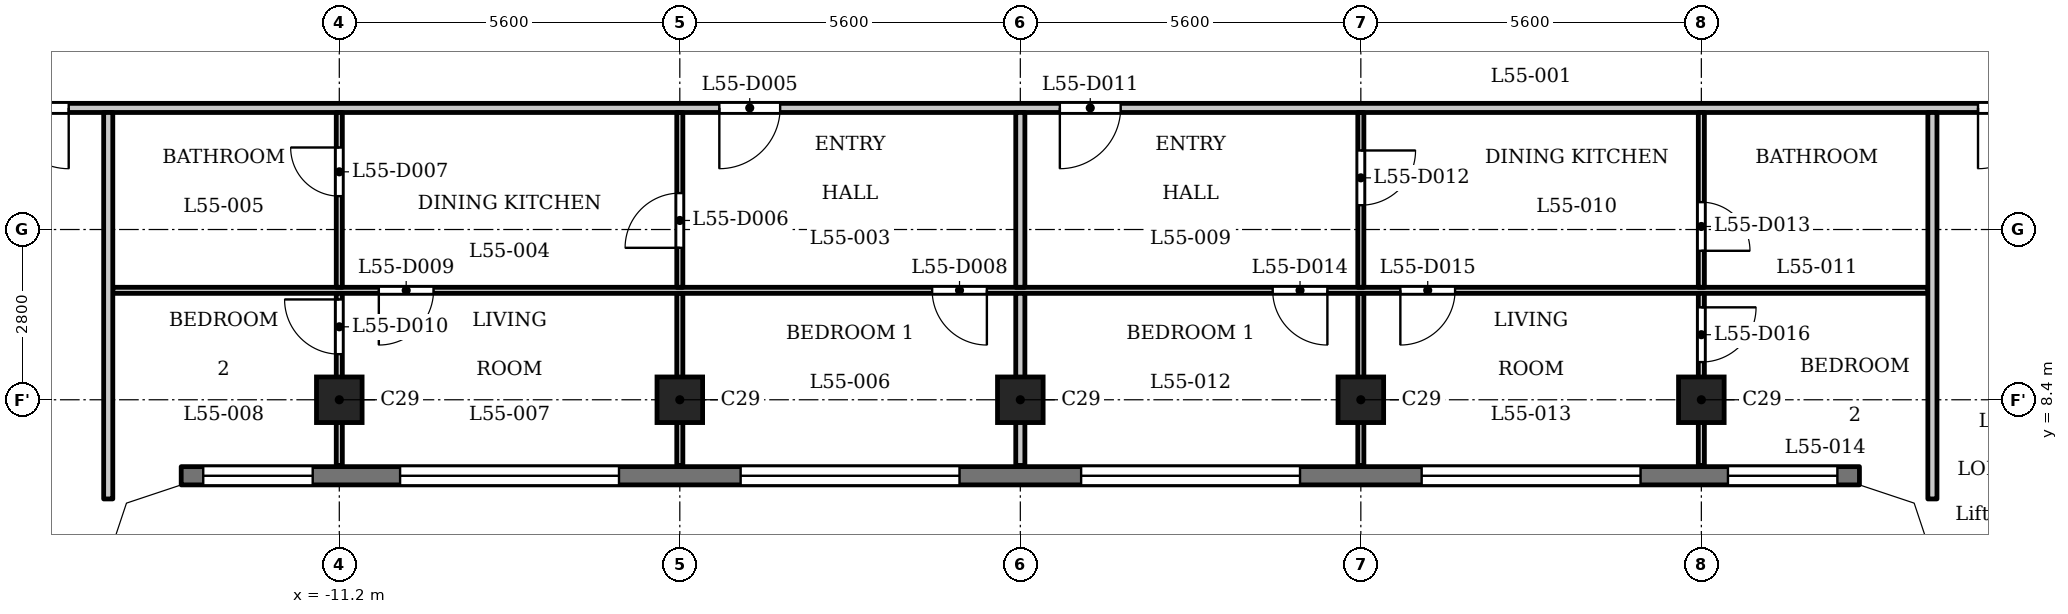
"""IFC4 building model, lengths in metres.
Left out: names, types, materials, properties, quantities, classifications, styles, units other than length and angle.
Written with IfcOpenShell. Run it as: python <this file> out.ifc"""

import sys

from ifc_helpers import new_model, si_unit, direction, frame, frame_2d, origin, origin_2d, place, context, subcontext, project, spatial, polyline, rectangle, outline, extrude, element, fill, save


model = new_model("IFC4")
c1 = context("Model", 3, precision=1e-05, world=origin(), true_north=direction((0.0, 1.0)))
c2 = subcontext(c1, "Body", "Model", "MODEL_VIEW")
j1 = project(units=[si_unit("LENGTHUNIT", "METRE"), si_unit("PLANEANGLEUNIT", "RADIAN")], contexts=[c1])
p1 = place(None, origin())
s1 = spatial("IfcSite", under=j1, at=p1, CompositionType="ELEMENT")
p2 = place(p1, origin())
s2 = spatial("IfcBuilding", under=s1, at=p2, CompositionType="ELEMENT")
p3 = place(p2, frame((0.0, 0.0, 213.4)))
s3 = spatial("IfcBuildingStorey", under=s2, at=p3, CompositionType="ELEMENT", Elevation=213.4)
for number, where, z_axis, x_axis in (
    (1, (-11.2, 8.4, 0.0), (0.0, 0.0, 1.0), (1.0, 0.0, 0.0)),
    (2, (-5.6, 8.4, 0.0), (0.0, 0.0, 1.0), (1.0, 0.0, 0.0)),
    (3, (0.0, 8.4, 0.0), (0.0, 0.0, 1.0), (1.0, 0.0, 0.0)),
    (4, (5.6, 8.4, 0.0), (0.0, 0.0, 1.0), (1.0, 0.0, 0.0)),
    (5, (11.2, 8.4, 0.0), (0.0, 0.0, 1.0), (1.0, 0.0, 0.0)),
):
    element("IfcColumn", number, at=place(p3, frame(where, z_axis=z_axis, x_axis=x_axis)), inside=s3, PredefinedType="COLUMN", context=c2, shape_type="SweptSolid", body=[
        extrude(rectangle(XDim=0.75, YDim=0.75, at=origin_2d()), origin(), (0.0, 0.0, 1.0), 3.5),
    ])
p4 = place(p3, frame((-13.8, 7.15, 0.0), z_axis=(0.0, 0.0, 1.0), x_axis=(1.0, 0.0, 0.0)))
e6 = element("IfcWall", 6, at=p4, inside=s3, PredefinedType="SOLIDWALL", context=c2, shape_type="SweptSolid", body=[
    extrude(rectangle(XDim=27.6, YDim=0.3, at=frame_2d((13.8, 0.0))), origin(), (0.0, 0.0, 1.0), 3.2),
])
p5 = place(p4, frame((0.363, 0.0, 0.9)))
e7 = element("IfcOpeningElement", 7, at=p5, cuts=e6, PredefinedType="OPENING", context=c2, shape_type="SweptSolid", body=[
    extrude(rectangle(XDim=1.8, YDim=1.25, at=frame_2d((0.9, 0.625))), frame((0.0, 0.16, 0.0), z_axis=(0.0, -1.0, 0.0), x_axis=(1.0, 0.0, 0.0)), (0.0, 0.0, 1.0), 0.32),
])
p6 = place(p4, frame((3.6, 0.0, 1.2)))
e8 = element("IfcOpeningElement", 8, at=p6, cuts=e6, PredefinedType="OPENING", context=c2, shape_type="SweptSolid", body=[
    extrude(rectangle(XDim=3.6, YDim=0.95, at=frame_2d((1.8, 0.475))), frame((0.0, 0.16, 0.0), z_axis=(0.0, -1.0, 0.0), x_axis=(1.0, 0.0, 0.0)), (0.0, 0.0, 1.0), 0.32),
])
p7 = place(p4, frame((9.2, 0.0, 1.2)))
e9 = element("IfcOpeningElement", 9, at=p7, cuts=e6, PredefinedType="OPENING", context=c2, shape_type="SweptSolid", body=[
    extrude(rectangle(XDim=3.6, YDim=0.95, at=frame_2d((1.8, 0.475))), frame((0.0, 0.16, 0.0), z_axis=(0.0, -1.0, 0.0), x_axis=(1.0, 0.0, 0.0)), (0.0, 0.0, 1.0), 0.32),
])
p8 = place(p4, frame((14.8, 0.0, 1.2)))
e10 = element("IfcOpeningElement", 10, at=p8, cuts=e6, PredefinedType="OPENING", context=c2, shape_type="SweptSolid", body=[
    extrude(rectangle(XDim=3.6, YDim=0.95, at=frame_2d((1.8, 0.475))), frame((0.0, 0.16, 0.0), z_axis=(0.0, -1.0, 0.0), x_axis=(1.0, 0.0, 0.0)), (0.0, 0.0, 1.0), 0.32),
])
p9 = place(p4, frame((20.4, 0.0, 1.2)))
e11 = element("IfcOpeningElement", 11, at=p9, cuts=e6, PredefinedType="OPENING", context=c2, shape_type="SweptSolid", body=[
    extrude(rectangle(XDim=3.6, YDim=0.95, at=frame_2d((1.8, 0.475))), frame((0.0, 0.16, 0.0), z_axis=(0.0, -1.0, 0.0), x_axis=(1.0, 0.0, 0.0)), (0.0, 0.0, 1.0), 0.32),
])
p10 = place(p4, frame((25.438, 0.0, 0.9)))
e12 = element("IfcOpeningElement", 12, at=p10, cuts=e6, PredefinedType="OPENING", context=c2, shape_type="SweptSolid", body=[
    extrude(rectangle(XDim=1.8, YDim=1.25, at=frame_2d((0.9, 0.625))), frame((0.0, 0.16, 0.0), z_axis=(0.0, -1.0, 0.0), x_axis=(1.0, 0.0, 0.0)), (0.0, 0.0, 1.0), 0.32),
])
p11 = place(p3, frame((-14.925, 10.2, 0.0), z_axis=(0.0, 0.0, 1.0), x_axis=(1.0, 0.0, 0.0)))
e13 = element("IfcWall", 13, at=p11, inside=s3, PredefinedType="PARTITIONING", context=c2, shape_type="SweptSolid", body=[
    extrude(rectangle(XDim=29.85, YDim=0.1, at=frame_2d((14.925, 0.0))), origin(), (0.0, 0.0, 1.0), 3.2),
])
p12 = place(p11, frame((13.475, 0.0, 0.0)))
e14 = element("IfcOpeningElement", 14, at=p12, cuts=e13, PredefinedType="OPENING", context=c2, shape_type="SweptSolid", body=[
    extrude(rectangle(XDim=0.9, YDim=2.1, at=frame_2d((0.45, 1.05))), frame((0.0, 0.06, 0.0), z_axis=(0.0, -1.0, 0.0), x_axis=(1.0, 0.0, 0.0)), (0.0, 0.0, 1.0), 0.12),
])
p13 = place(p11, frame((4.375, 0.0, 0.0)))
e15 = element("IfcOpeningElement", 15, at=p13, cuts=e13, PredefinedType="OPENING", context=c2, shape_type="SweptSolid", body=[
    extrude(rectangle(XDim=0.9, YDim=2.1, at=frame_2d((0.45, 1.05))), frame((0.0, 0.06, 0.0), z_axis=(0.0, -1.0, 0.0), x_axis=(1.0, 0.0, 0.0)), (0.0, 0.0, 1.0), 0.12),
])
p14 = place(p11, frame((19.075, 0.0, 0.0)))
e16 = element("IfcOpeningElement", 16, at=p14, cuts=e13, PredefinedType="OPENING", context=c2, shape_type="SweptSolid", body=[
    extrude(rectangle(XDim=0.9, YDim=2.1, at=frame_2d((0.45, 1.05))), frame((0.0, 0.06, 0.0), z_axis=(0.0, -1.0, 0.0), x_axis=(1.0, 0.0, 0.0)), (0.0, 0.0, 1.0), 0.12),
])
p15 = place(p11, frame((21.175, 0.0, 0.0)))
e17 = element("IfcOpeningElement", 17, at=p15, cuts=e13, PredefinedType="OPENING", context=c2, shape_type="SweptSolid", body=[
    extrude(rectangle(XDim=0.9, YDim=2.1, at=frame_2d((0.45, 1.05))), frame((0.0, 0.06, 0.0), z_axis=(0.0, -1.0, 0.0), x_axis=(1.0, 0.0, 0.0)), (0.0, 0.0, 1.0), 0.12),
])
p16 = place(p3, frame((-17.4, 13.2, 0.0), z_axis=(0.0, 0.0, 1.0), x_axis=(1.0, 0.0, 0.0)))
e18 = element("IfcWall", 18, at=p16, inside=s3, PredefinedType="PARTITIONING", context=c2, shape_type="SweptSolid", body=[
    extrude(rectangle(XDim=34.8, YDim=0.15, at=frame_2d((17.4, 0.0))), origin(), (0.0, 0.0, 1.0), 3.2),
])
p17 = place(p16, frame((0.75, 0.0, 0.0)))
e19 = element("IfcOpeningElement", 19, at=p17, cuts=e18, PredefinedType="OPENING", context=c2, shape_type="SweptSolid", body=[
    extrude(rectangle(XDim=1.0, YDim=2.1, at=frame_2d((0.5, 1.05))), frame((0.0, 0.085, 0.0), z_axis=(0.0, -1.0, 0.0), x_axis=(1.0, 0.0, 0.0)), (0.0, 0.0, 1.0), 0.17),
])
p18 = place(p16, frame((33.15, 0.0, 0.0)))
e20 = element("IfcOpeningElement", 20, at=p18, cuts=e18, PredefinedType="OPENING", context=c2, shape_type="SweptSolid", body=[
    extrude(rectangle(XDim=1.0, YDim=2.1, at=frame_2d((0.5, 1.05))), frame((0.0, 0.085, 0.0), z_axis=(0.0, -1.0, 0.0), x_axis=(1.0, 0.0, 0.0)), (0.0, 0.0, 1.0), 0.17),
])
p19 = place(p16, frame((12.45, 0.0, 0.0)))
e21 = element("IfcOpeningElement", 21, at=p19, cuts=e18, PredefinedType="OPENING", context=c2, shape_type="SweptSolid", body=[
    extrude(rectangle(XDim=1.0, YDim=2.1, at=frame_2d((0.5, 1.05))), frame((0.0, 0.085, 0.0), z_axis=(0.0, -1.0, 0.0), x_axis=(1.0, 0.0, 0.0)), (0.0, 0.0, 1.0), 0.17),
])
p20 = place(p16, frame((18.05, 0.0, 0.0)))
e22 = element("IfcOpeningElement", 22, at=p20, cuts=e18, PredefinedType="OPENING", context=c2, shape_type="SweptSolid", body=[
    extrude(rectangle(XDim=1.0, YDim=2.1, at=frame_2d((0.5, 1.05))), frame((0.0, 0.085, 0.0), z_axis=(0.0, -1.0, 0.0), x_axis=(1.0, 0.0, 0.0)), (0.0, 0.0, 1.0), 0.17),
])
p21 = place(p3, frame((-15.0, 6.769, 0.0), z_axis=(0.0, 0.0, 1.0), x_axis=(0.0, 1.0, 0.0)))
e23 = element("IfcWall", 23, at=p21, inside=s3, PredefinedType="PARTITIONING", context=c2, shape_type="SweptSolid", body=[
    extrude(rectangle(XDim=6.356, YDim=0.15, at=frame_2d((3.178, 0.0))), origin(), (0.0, 0.0, 1.0), 3.2),
])
p22 = place(p3, frame((-11.2, 7.32, 0.0), z_axis=(0.0, 0.0, 1.0), x_axis=(0.0, 1.0, 0.0)))
e24 = element("IfcWall", 24, at=p22, inside=s3, PredefinedType="PARTITIONING", context=c2, shape_type="SweptSolid", body=[
    extrude(rectangle(XDim=2.83, YDim=0.1, at=frame_2d((1.415, 0.0))), origin(), (0.0, 0.0, 1.0), 3.2),
])
p23 = place(p22, frame((1.83, 0.0, 0.0)))
e25 = element("IfcOpeningElement", 25, at=p23, cuts=e24, PredefinedType="OPENING", context=c2, shape_type="SweptSolid", body=[
    extrude(rectangle(XDim=0.9, YDim=2.1, at=frame_2d((0.45, 1.05))), frame((0.0, 0.06, 0.0), z_axis=(0.0, -1.0, 0.0), x_axis=(1.0, 0.0, 0.0)), (0.0, 0.0, 1.0), 0.12),
])
p24 = place(p3, frame((-11.2, 10.25, 0.0), z_axis=(0.0, 0.0, 1.0), x_axis=(0.0, 1.0, 0.0)))
e26 = element("IfcWall", 26, at=p24, inside=s3, PredefinedType="PARTITIONING", context=c2, shape_type="SweptSolid", body=[
    extrude(rectangle(XDim=2.875, YDim=0.1, at=frame_2d((1.438, 0.0))), origin(), (0.0, 0.0, 1.0), 3.2),
])
p25 = place(p24, frame((1.499, 0.0, 0.0)))
e27 = element("IfcOpeningElement", 27, at=p25, cuts=e26, PredefinedType="OPENING", context=c2, shape_type="SweptSolid", body=[
    extrude(rectangle(XDim=0.8, YDim=2.1, at=frame_2d((0.4, 1.05))), frame((0.0, 0.06, 0.0), z_axis=(0.0, -1.0, 0.0), x_axis=(1.0, 0.0, 0.0)), (0.0, 0.0, 1.0), 0.12),
])
p26 = place(p3, frame((-5.6, 7.32, 0.0), z_axis=(0.0, 0.0, 1.0), x_axis=(0.0, 1.0, 0.0)))
e28 = element("IfcWall", 28, at=p26, inside=s3, PredefinedType="PARTITIONING", context=c2, shape_type="SweptSolid", body=[
    extrude(rectangle(XDim=2.83, YDim=0.1, at=frame_2d((1.415, 0.0))), origin(), (0.0, 0.0, 1.0), 3.2),
])
p27 = place(p3, frame((-5.6, 10.25, 0.0), z_axis=(0.0, 0.0, 1.0), x_axis=(0.0, 1.0, 0.0)))
e29 = element("IfcWall", 29, at=p27, inside=s3, PredefinedType="PARTITIONING", context=c2, shape_type="SweptSolid", body=[
    extrude(rectangle(XDim=2.875, YDim=0.1, at=frame_2d((1.438, 0.0))), origin(), (0.0, 0.0, 1.0), 3.2),
])
p28 = place(p27, frame((0.649, 0.0, 0.0)))
e30 = element("IfcOpeningElement", 30, at=p28, cuts=e29, PredefinedType="OPENING", context=c2, shape_type="SweptSolid", body=[
    extrude(rectangle(XDim=0.9, YDim=2.1, at=frame_2d((0.45, 1.05))), frame((0.0, 0.06, 0.0), z_axis=(0.0, -1.0, 0.0), x_axis=(1.0, 0.0, 0.0)), (0.0, 0.0, 1.0), 0.12),
])
p29 = place(p3, frame((0.0, 7.32, 0.0), z_axis=(0.0, 0.0, 1.0), x_axis=(0.0, 1.0, 0.0)))
e31 = element("IfcWall", 31, at=p29, inside=s3, PredefinedType="PARTITIONING", context=c2, shape_type="SweptSolid", body=[
    extrude(rectangle(XDim=2.83, YDim=0.15, at=frame_2d((1.415, 0.0))), origin(), (0.0, 0.0, 1.0), 3.2),
])
p30 = place(p3, frame((0.0, 10.25, 0.0), z_axis=(0.0, 0.0, 1.0), x_axis=(0.0, 1.0, 0.0)))
e32 = element("IfcWall", 32, at=p30, inside=s3, PredefinedType="PARTITIONING", context=c2, shape_type="SweptSolid", body=[
    extrude(rectangle(XDim=2.875, YDim=0.15, at=frame_2d((1.438, 0.0))), origin(), (0.0, 0.0, 1.0), 3.2),
])
p31 = place(p3, frame((5.6, 7.32, 0.0), z_axis=(0.0, 0.0, 1.0), x_axis=(0.0, 1.0, 0.0)))
e33 = element("IfcWall", 33, at=p31, inside=s3, PredefinedType="PARTITIONING", context=c2, shape_type="SweptSolid", body=[
    extrude(rectangle(XDim=2.83, YDim=0.1, at=frame_2d((1.415, 0.0))), origin(), (0.0, 0.0, 1.0), 3.2),
])
p32 = place(p3, frame((5.6, 10.25, 0.0), z_axis=(0.0, 0.0, 1.0), x_axis=(0.0, 1.0, 0.0)))
e34 = element("IfcWall", 34, at=p32, inside=s3, PredefinedType="PARTITIONING", context=c2, shape_type="SweptSolid", body=[
    extrude(rectangle(XDim=2.875, YDim=0.1, at=frame_2d((1.438, 0.0))), origin(), (0.0, 0.0, 1.0), 3.2),
])
p33 = place(p32, frame((1.35, 0.0, 0.0)))
e35 = element("IfcOpeningElement", 35, at=p33, cuts=e34, PredefinedType="OPENING", context=c2, shape_type="SweptSolid", body=[
    extrude(rectangle(XDim=0.9, YDim=2.1, at=frame_2d((0.45, 1.05))), frame((0.0, 0.06, 0.0), z_axis=(0.0, -1.0, 0.0), x_axis=(1.0, 0.0, 0.0)), (0.0, 0.0, 1.0), 0.12),
])
p34 = place(p3, frame((11.2, 7.32, 0.0), z_axis=(0.0, 0.0, 1.0), x_axis=(0.0, 1.0, 0.0)))
e36 = element("IfcWall", 36, at=p34, inside=s3, PredefinedType="PARTITIONING", context=c2, shape_type="SweptSolid", body=[
    extrude(rectangle(XDim=2.83, YDim=0.1, at=frame_2d((1.415, 0.0))), origin(), (0.0, 0.0, 1.0), 3.2),
])
p35 = place(p34, frame((1.7, 0.0, 0.0)))
e37 = element("IfcOpeningElement", 37, at=p35, cuts=e36, PredefinedType="OPENING", context=c2, shape_type="SweptSolid", body=[
    extrude(rectangle(XDim=0.9, YDim=2.1, at=frame_2d((0.45, 1.05))), frame((0.0, 0.06, 0.0), z_axis=(0.0, -1.0, 0.0), x_axis=(1.0, 0.0, 0.0)), (0.0, 0.0, 1.0), 0.12),
])
p36 = place(p3, frame((11.2, 10.25, 0.0), z_axis=(0.0, 0.0, 1.0), x_axis=(0.0, 1.0, 0.0)))
e38 = element("IfcWall", 38, at=p36, inside=s3, PredefinedType="PARTITIONING", context=c2, shape_type="SweptSolid", body=[
    extrude(rectangle(XDim=2.875, YDim=0.1, at=frame_2d((1.438, 0.0))), origin(), (0.0, 0.0, 1.0), 3.2),
])
p37 = place(p36, frame((0.6, 0.0, 0.0)))
e39 = element("IfcOpeningElement", 39, at=p37, cuts=e38, PredefinedType="OPENING", context=c2, shape_type="SweptSolid", body=[
    extrude(rectangle(XDim=0.8, YDim=2.1, at=frame_2d((0.4, 1.05))), frame((0.0, 0.06, 0.0), z_axis=(0.0, -1.0, 0.0), x_axis=(1.0, 0.0, 0.0)), (0.0, 0.0, 1.0), 0.12),
])
p38 = place(p3, frame((15.0, 6.769, 0.0), z_axis=(0.0, 0.0, 1.0), x_axis=(0.0, 1.0, 0.0)))
e40 = element("IfcWall", 40, at=p38, inside=s3, PredefinedType="PARTITIONING", context=c2, shape_type="SweptSolid", body=[
    extrude(rectangle(XDim=6.356, YDim=0.15, at=frame_2d((3.178, 0.0))), origin(), (0.0, 0.0, 1.0), 3.2),
])
p39 = place(p3, origin())
e41 = element("IfcWall", 41, at=p39, inside=s3, PredefinedType="SOLIDWALL", context=c2, shape_type="SweptSolid", body=[
    extrude(outline(polyline([(-13.849, 7.3), (-14.937, 6.937), (-15.3, 5.849), (-15.3, 5.8), (-15.0, 5.8), (-14.7, 6.7), (-13.8, 7.0), (-13.8, 7.3), (-13.849, 7.3)])), origin(), (0.0, 0.0, 1.0), 3.2),
])
e42 = element("IfcWall", 42, at=p39, inside=s3, PredefinedType="SOLIDWALL", context=c2, shape_type="SweptSolid", body=[
    extrude(outline(polyline([(14.937, 6.937), (13.849, 7.3), (13.8, 7.3), (13.8, 7.0), (14.7, 6.7), (15.0, 5.8), (15.3, 5.8), (15.3, 5.849), (14.937, 6.937)])), origin(), (0.0, 0.0, 1.0), 3.2),
])
p40 = place(p17, origin())
e43 = element("IfcDoor", 43, at=p40, inside=s3, OperationType="SINGLE_SWING_RIGHT", PredefinedType="DOOR", context=c2, shape_type="SweptSolid", body=[
    extrude(rectangle(XDim=1.0, YDim=2.1, at=frame_2d((0.5, 1.05))), frame((0.0, 0.025, 0.0), z_axis=(0.0, -1.0, 0.0), x_axis=(1.0, 0.0, 0.0)), (0.0, 0.0, 1.0), 0.05),
])
fill(e19, e43)
p41 = place(p18, origin())
e44 = element("IfcDoor", 44, at=p41, inside=s3, OperationType="SINGLE_SWING_LEFT", PredefinedType="DOOR", context=c2, shape_type="SweptSolid", body=[
    extrude(rectangle(XDim=1.0, YDim=2.1, at=frame_2d((0.5, 1.05))), frame((0.0, 0.025, 0.0), z_axis=(0.0, -1.0, 0.0), x_axis=(1.0, 0.0, 0.0)), (0.0, 0.0, 1.0), 0.05),
])
fill(e20, e44)
p42 = place(p19, origin())
e45 = element("IfcDoor", 45, at=p42, inside=s3, OperationType="SINGLE_SWING_LEFT", PredefinedType="DOOR", context=c2, shape_type="SweptSolid", body=[
    extrude(rectangle(XDim=1.0, YDim=2.1, at=frame_2d((0.5, 1.05))), frame((0.0, 0.025, 0.0), z_axis=(0.0, -1.0, 0.0), x_axis=(1.0, 0.0, 0.0)), (0.0, 0.0, 1.0), 0.05),
])
fill(e21, e45)
p43 = place(p28, origin())
e46 = element("IfcDoor", 46, at=p43, inside=s3, OperationType="SINGLE_SWING_RIGHT", PredefinedType="DOOR", context=c2, shape_type="SweptSolid", body=[
    extrude(rectangle(XDim=0.9, YDim=2.1, at=frame_2d((0.45, 1.05))), frame((0.0, 0.025, 0.0), z_axis=(0.0, -1.0, 0.0), x_axis=(1.0, 0.0, 0.0)), (0.0, 0.0, 1.0), 0.05),
])
fill(e30, e46)
p44 = place(p25, origin())
e47 = element("IfcDoor", 47, at=p44, inside=s3, OperationType="SINGLE_SWING_LEFT", PredefinedType="DOOR", context=c2, shape_type="SweptSolid", body=[
    extrude(rectangle(XDim=0.8, YDim=2.1, at=frame_2d((0.4, 1.05))), frame((0.0, 0.025, 0.0), z_axis=(0.0, -1.0, 0.0), x_axis=(1.0, 0.0, 0.0)), (0.0, 0.0, 1.0), 0.05),
])
fill(e27, e47)
p45 = place(p12, origin())
e48 = element("IfcDoor", 48, at=p45, inside=s3, OperationType="SINGLE_SWING_RIGHT", PredefinedType="DOOR", context=c2, shape_type="SweptSolid", body=[
    extrude(rectangle(XDim=0.9, YDim=2.1, at=frame_2d((0.45, 1.05))), frame((0.0, 0.025, 0.0), z_axis=(0.0, -1.0, 0.0), x_axis=(1.0, 0.0, 0.0)), (0.0, 0.0, 1.0), 0.05),
])
fill(e14, e48)
p46 = place(p13, origin())
e49 = element("IfcDoor", 49, at=p46, inside=s3, OperationType="SINGLE_SWING_LEFT", PredefinedType="DOOR", context=c2, shape_type="SweptSolid", body=[
    extrude(rectangle(XDim=0.9, YDim=2.1, at=frame_2d((0.45, 1.05))), frame((0.0, 0.025, 0.0), z_axis=(0.0, -1.0, 0.0), x_axis=(1.0, 0.0, 0.0)), (0.0, 0.0, 1.0), 0.05),
])
fill(e15, e49)
p47 = place(p23, origin())
e50 = element("IfcDoor", 50, at=p47, inside=s3, OperationType="SINGLE_SWING_LEFT", PredefinedType="DOOR", context=c2, shape_type="SweptSolid", body=[
    extrude(rectangle(XDim=0.9, YDim=2.1, at=frame_2d((0.45, 1.05))), frame((0.0, 0.025, 0.0), z_axis=(0.0, -1.0, 0.0), x_axis=(1.0, 0.0, 0.0)), (0.0, 0.0, 1.0), 0.05),
])
fill(e25, e50)
p48 = place(p20, origin())
e51 = element("IfcDoor", 51, at=p48, inside=s3, OperationType="SINGLE_SWING_LEFT", PredefinedType="DOOR", context=c2, shape_type="SweptSolid", body=[
    extrude(rectangle(XDim=1.0, YDim=2.1, at=frame_2d((0.5, 1.05))), frame((0.0, 0.025, 0.0), z_axis=(0.0, -1.0, 0.0), x_axis=(1.0, 0.0, 0.0)), (0.0, 0.0, 1.0), 0.05),
])
fill(e22, e51)
p49 = place(p33, origin())
e52 = element("IfcDoor", 52, at=p49, inside=s3, OperationType="SINGLE_SWING_RIGHT", PredefinedType="DOOR", context=c2, shape_type="SweptSolid", body=[
    extrude(rectangle(XDim=0.9, YDim=2.1, at=frame_2d((0.45, 1.05))), frame((0.0, 0.025, 0.0), z_axis=(0.0, -1.0, 0.0), x_axis=(1.0, 0.0, 0.0)), (0.0, 0.0, 1.0), 0.05),
])
fill(e35, e52)
p50 = place(p37, origin())
e53 = element("IfcDoor", 53, at=p50, inside=s3, OperationType="SINGLE_SWING_LEFT", PredefinedType="DOOR", context=c2, shape_type="SweptSolid", body=[
    extrude(rectangle(XDim=0.8, YDim=2.1, at=frame_2d((0.4, 1.05))), frame((0.0, 0.025, 0.0), z_axis=(0.0, -1.0, 0.0), x_axis=(1.0, 0.0, 0.0)), (0.0, 0.0, 1.0), 0.05),
])
fill(e39, e53)
p51 = place(p14, origin())
e54 = element("IfcDoor", 54, at=p51, inside=s3, OperationType="SINGLE_SWING_RIGHT", PredefinedType="DOOR", context=c2, shape_type="SweptSolid", body=[
    extrude(rectangle(XDim=0.9, YDim=2.1, at=frame_2d((0.45, 1.05))), frame((0.0, 0.025, 0.0), z_axis=(0.0, -1.0, 0.0), x_axis=(1.0, 0.0, 0.0)), (0.0, 0.0, 1.0), 0.05),
])
fill(e16, e54)
p52 = place(p15, origin())
e55 = element("IfcDoor", 55, at=p52, inside=s3, OperationType="SINGLE_SWING_LEFT", PredefinedType="DOOR", context=c2, shape_type="SweptSolid", body=[
    extrude(rectangle(XDim=0.9, YDim=2.1, at=frame_2d((0.45, 1.05))), frame((0.0, 0.025, 0.0), z_axis=(0.0, -1.0, 0.0), x_axis=(1.0, 0.0, 0.0)), (0.0, 0.0, 1.0), 0.05),
])
fill(e17, e55)
p53 = place(p35, origin())
e56 = element("IfcDoor", 56, at=p53, inside=s3, OperationType="SINGLE_SWING_RIGHT", PredefinedType="DOOR", context=c2, shape_type="SweptSolid", body=[
    extrude(rectangle(XDim=0.9, YDim=2.1, at=frame_2d((0.45, 1.05))), frame((0.0, 0.025, 0.0), z_axis=(0.0, -1.0, 0.0), x_axis=(1.0, 0.0, 0.0)), (0.0, 0.0, 1.0), 0.05),
])
fill(e37, e56)
p54 = place(p5, origin())
e57 = element("IfcWindow", 57, at=p54, inside=s3, PartitioningType="SINGLE_PANEL", PredefinedType="WINDOW", context=c2, shape_type="SweptSolid", body=[
    extrude(rectangle(XDim=1.8, YDim=1.25, at=frame_2d((0.9, 0.625))), frame((0.0, 0.03, 0.0), z_axis=(0.0, -1.0, 0.0), x_axis=(1.0, 0.0, 0.0)), (0.0, 0.0, 1.0), 0.06),
])
fill(e7, e57)
p55 = place(p6, origin())
e58 = element("IfcWindow", 58, at=p55, inside=s3, PartitioningType="SINGLE_PANEL", PredefinedType="WINDOW", context=c2, shape_type="SweptSolid", body=[
    extrude(rectangle(XDim=3.6, YDim=0.95, at=frame_2d((1.8, 0.475))), frame((0.0, 0.03, 0.0), z_axis=(0.0, -1.0, 0.0), x_axis=(1.0, 0.0, 0.0)), (0.0, 0.0, 1.0), 0.06),
])
fill(e8, e58)
p56 = place(p7, origin())
e59 = element("IfcWindow", 59, at=p56, inside=s3, PartitioningType="SINGLE_PANEL", PredefinedType="WINDOW", context=c2, shape_type="SweptSolid", body=[
    extrude(rectangle(XDim=3.6, YDim=0.95, at=frame_2d((1.8, 0.475))), frame((0.0, 0.03, 0.0), z_axis=(0.0, -1.0, 0.0), x_axis=(1.0, 0.0, 0.0)), (0.0, 0.0, 1.0), 0.06),
])
fill(e9, e59)
p57 = place(p8, origin())
e60 = element("IfcWindow", 60, at=p57, inside=s3, PartitioningType="SINGLE_PANEL", PredefinedType="WINDOW", context=c2, shape_type="SweptSolid", body=[
    extrude(rectangle(XDim=3.6, YDim=0.95, at=frame_2d((1.8, 0.475))), frame((0.0, 0.03, 0.0), z_axis=(0.0, -1.0, 0.0), x_axis=(1.0, 0.0, 0.0)), (0.0, 0.0, 1.0), 0.06),
])
fill(e10, e60)
p58 = place(p9, origin())
e61 = element("IfcWindow", 61, at=p58, inside=s3, PartitioningType="SINGLE_PANEL", PredefinedType="WINDOW", context=c2, shape_type="SweptSolid", body=[
    extrude(rectangle(XDim=3.6, YDim=0.95, at=frame_2d((1.8, 0.475))), frame((0.0, 0.03, 0.0), z_axis=(0.0, -1.0, 0.0), x_axis=(1.0, 0.0, 0.0)), (0.0, 0.0, 1.0), 0.06),
])
fill(e11, e61)
p59 = place(p10, origin())
e62 = element("IfcWindow", 62, at=p59, inside=s3, PartitioningType="SINGLE_PANEL", PredefinedType="WINDOW", context=c2, shape_type="SweptSolid", body=[
    extrude(rectangle(XDim=1.8, YDim=1.25, at=frame_2d((0.9, 0.625))), frame((0.0, 0.03, 0.0), z_axis=(0.0, -1.0, 0.0), x_axis=(1.0, 0.0, 0.0)), (0.0, 0.0, 1.0), 0.06),
])
fill(e12, e62)
save(model, sys.argv[1])
